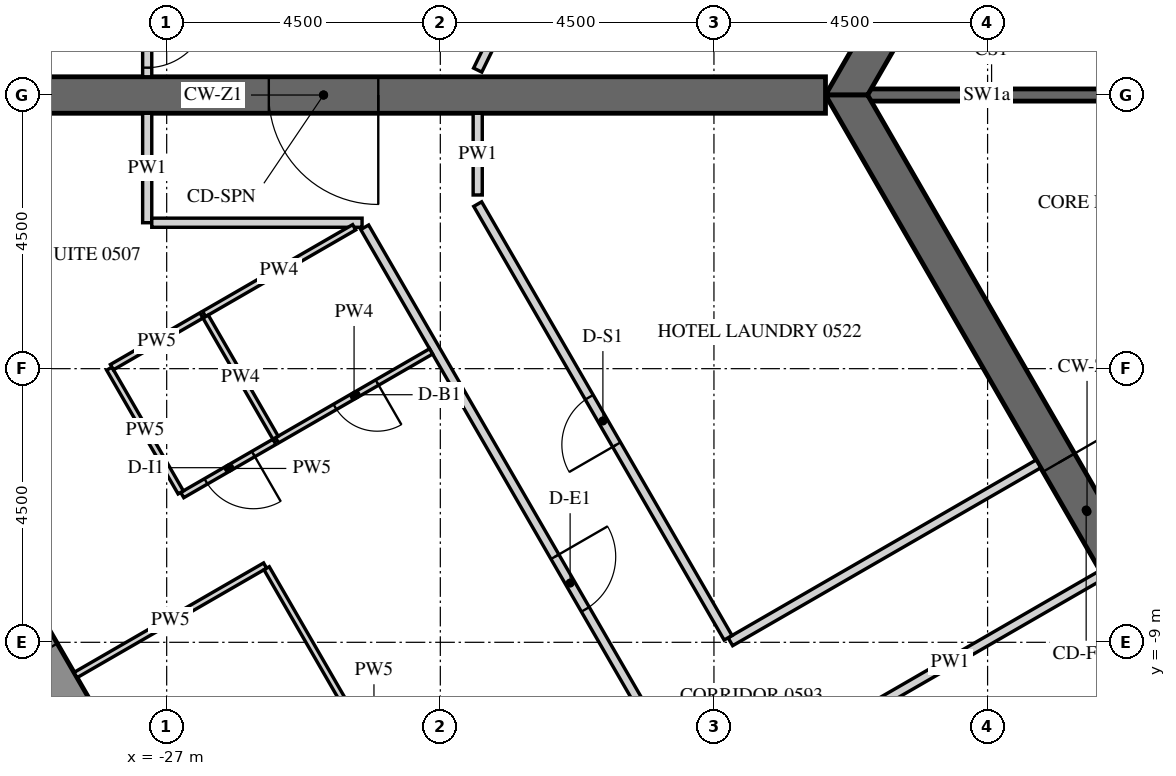
"""IFC4 building model, lengths in metres.
Left out: names, types, materials, properties, quantities, classifications, styles, units other than length and angle.
Written with IfcOpenShell. Run it as: python <this file> out.ifc"""

import sys

from ifc_helpers import new_model, si_unit, direction, frame, frame_2d, origin, place, context, subcontext, project, spatial, polyline, rectangle, outline, extrude, element, fill, save


model = new_model("IFC4")
c1 = context("Model", 3, precision=1e-05, world=origin(), true_north=direction((0.0, 1.0)))
c2 = subcontext(c1, "Body", "Model", "MODEL_VIEW")
j1 = project(units=[si_unit("LENGTHUNIT", "METRE"), si_unit("PLANEANGLEUNIT", "RADIAN")], contexts=[c1])
p1 = place(None, origin())
s1 = spatial("IfcSite", under=j1, at=p1, CompositionType="ELEMENT")
p2 = place(p1, origin())
s2 = spatial("IfcBuilding", under=s1, at=p2, CompositionType="ELEMENT")
p3 = place(p2, frame((0.0, 0.0, 80.4)))
s3 = spatial("IfcBuildingStorey", under=s2, at=p3, CompositionType="ELEMENT", Elevation=80.4)
p4 = place(p3, frame((-19.595, 27.633, -0.15), z_axis=(0.0, 0.0, 1.0), x_axis=(-0.438368285794, -0.898795441694, 0.0)))
e1 = element("IfcWall", 1, at=p4, inside=s3, PredefinedType="SOLIDWALL", context=c2, shape_type="SweptSolid", body=[
    extrude(outline(polyline([(-0.026, -0.275), (30.093, -0.275), (30.048, 0.275), (0.026, 0.275), (-0.026, -0.275)])), origin(), (0.0, 0.0, 1.0), 3.9),
])
p5 = place(p4, frame((1.236, 0.0, 1.05)))
e2 = element("IfcOpeningElement", 2, at=p5, cuts=e1, PredefinedType="OPENING", context=c2, shape_type="SweptSolid", body=[
    extrude(rectangle(XDim=2.4, YDim=2.4, at=frame_2d((1.2, 1.2))), frame((0.0, 0.285, 0.0), z_axis=(0.0, -1.0, 0.0), x_axis=(1.0, 0.0, 0.0)), (0.0, 0.0, 1.0), 0.57),
])
p6 = place(p4, frame((4.835, 0.0, 1.05)))
e3 = element("IfcOpeningElement", 3, at=p6, cuts=e1, PredefinedType="OPENING", context=c2, shape_type="SweptSolid", body=[
    extrude(rectangle(XDim=2.4, YDim=2.4, at=frame_2d((1.2, 1.2))), frame((0.0, 0.285, 0.0), z_axis=(0.0, -1.0, 0.0), x_axis=(1.0, 0.0, 0.0)), (0.0, 0.0, 1.0), 0.57),
])
p7 = place(p4, frame((8.436, 0.0, 1.05)))
e4 = element("IfcOpeningElement", 4, at=p7, cuts=e1, PredefinedType="OPENING", context=c2, shape_type="SweptSolid", body=[
    extrude(rectangle(XDim=2.4, YDim=2.4, at=frame_2d((1.2, 1.2))), frame((0.0, 0.285, 0.0), z_axis=(0.0, -1.0, 0.0), x_axis=(1.0, 0.0, 0.0)), (0.0, 0.0, 1.0), 0.57),
])
p8 = place(p4, frame((12.035, 0.0, 1.05)))
e5 = element("IfcOpeningElement", 5, at=p8, cuts=e1, PredefinedType="OPENING", context=c2, shape_type="SweptSolid", body=[
    extrude(rectangle(XDim=2.4, YDim=2.4, at=frame_2d((1.2, 1.2))), frame((0.0, 0.285, 0.0), z_axis=(0.0, -1.0, 0.0), x_axis=(1.0, 0.0, 0.0)), (0.0, 0.0, 1.0), 0.57),
])
p9 = place(p4, frame((15.635, 0.0, 1.05)))
e6 = element("IfcOpeningElement", 6, at=p9, cuts=e1, PredefinedType="OPENING", context=c2, shape_type="SweptSolid", body=[
    extrude(rectangle(XDim=2.4, YDim=2.4, at=frame_2d((1.2, 1.2))), frame((0.0, 0.285, 0.0), z_axis=(0.0, -1.0, 0.0), x_axis=(1.0, 0.0, 0.0)), (0.0, 0.0, 1.0), 0.57),
])
p10 = place(p4, frame((19.236, 0.0, 1.05)))
e7 = element("IfcOpeningElement", 7, at=p10, cuts=e1, PredefinedType="OPENING", context=c2, shape_type="SweptSolid", body=[
    extrude(rectangle(XDim=2.4, YDim=2.4, at=frame_2d((1.2, 1.2))), frame((0.0, 0.285, 0.0), z_axis=(0.0, -1.0, 0.0), x_axis=(1.0, 0.0, 0.0)), (0.0, 0.0, 1.0), 0.57),
])
p11 = place(p4, frame((22.835, 0.0, 1.05)))
e8 = element("IfcOpeningElement", 8, at=p11, cuts=e1, PredefinedType="OPENING", context=c2, shape_type="SweptSolid", body=[
    extrude(rectangle(XDim=2.4, YDim=2.4, at=frame_2d((1.2, 1.2))), frame((0.0, 0.285, 0.0), z_axis=(0.0, -1.0, 0.0), x_axis=(1.0, 0.0, 0.0)), (0.0, 0.0, 1.0), 0.57),
])
p12 = place(p4, frame((26.436, 0.0, 1.05)))
e9 = element("IfcOpeningElement", 9, at=p12, cuts=e1, PredefinedType="OPENING", context=c2, shape_type="SweptSolid", body=[
    extrude(rectangle(XDim=2.4, YDim=2.4, at=frame_2d((1.2, 1.2))), frame((0.0, 0.285, 0.0), z_axis=(0.0, -1.0, 0.0), x_axis=(1.0, 0.0, 0.0)), (0.0, 0.0, 1.0), 0.57),
])
p13 = place(p3, frame((-32.655, -2.89, -0.15), z_axis=(0.0, 0.0, 1.0), x_axis=(0.499997711317, -0.866026725152, 0.0)))
e10 = element("IfcWall", 10, at=p13, inside=s3, PredefinedType="SOLIDWALL", context=c2, shape_type="SweptSolid", body=[
    extrude(outline(polyline([(-0.022, -0.275), (30.097, -0.275), (30.045, 0.275), (0.022, 0.275), (-0.022, -0.275)])), origin(), (0.0, 0.0, 1.0), 3.9),
])
p14 = place(p13, frame((1.236, 0.0, 1.05)))
e11 = element("IfcOpeningElement", 11, at=p14, cuts=e10, PredefinedType="OPENING", context=c2, shape_type="SweptSolid", body=[
    extrude(rectangle(XDim=2.4, YDim=2.4, at=frame_2d((1.2, 1.2))), frame((0.0, 0.285, 0.0), z_axis=(0.0, -1.0, 0.0), x_axis=(1.0, 0.0, 0.0)), (0.0, 0.0, 1.0), 0.57),
])
p15 = place(p13, frame((4.835, 0.0, 1.05)))
e12 = element("IfcOpeningElement", 12, at=p15, cuts=e10, PredefinedType="OPENING", context=c2, shape_type="SweptSolid", body=[
    extrude(rectangle(XDim=2.4, YDim=2.4, at=frame_2d((1.2, 1.2))), frame((0.0, 0.285, 0.0), z_axis=(0.0, -1.0, 0.0), x_axis=(1.0, 0.0, 0.0)), (0.0, 0.0, 1.0), 0.57),
])
p16 = place(p13, frame((8.436, 0.0, 1.05)))
e13 = element("IfcOpeningElement", 13, at=p16, cuts=e10, PredefinedType="OPENING", context=c2, shape_type="SweptSolid", body=[
    extrude(rectangle(XDim=2.4, YDim=2.4, at=frame_2d((1.2, 1.2))), frame((0.0, 0.285, 0.0), z_axis=(0.0, -1.0, 0.0), x_axis=(1.0, 0.0, 0.0)), (0.0, 0.0, 1.0), 0.57),
])
p17 = place(p13, frame((12.035, 0.0, 1.05)))
e14 = element("IfcOpeningElement", 14, at=p17, cuts=e10, PredefinedType="OPENING", context=c2, shape_type="SweptSolid", body=[
    extrude(rectangle(XDim=2.4, YDim=2.4, at=frame_2d((1.2, 1.2))), frame((0.0, 0.285, 0.0), z_axis=(0.0, -1.0, 0.0), x_axis=(1.0, 0.0, 0.0)), (0.0, 0.0, 1.0), 0.57),
])
p18 = place(p13, frame((15.635, 0.0, 1.05)))
e15 = element("IfcOpeningElement", 15, at=p18, cuts=e10, PredefinedType="OPENING", context=c2, shape_type="SweptSolid", body=[
    extrude(rectangle(XDim=2.4, YDim=2.4, at=frame_2d((1.2, 1.2))), frame((0.0, 0.285, 0.0), z_axis=(0.0, -1.0, 0.0), x_axis=(1.0, 0.0, 0.0)), (0.0, 0.0, 1.0), 0.57),
])
p19 = place(p13, frame((19.236, 0.0, 1.05)))
e16 = element("IfcOpeningElement", 16, at=p19, cuts=e10, PredefinedType="OPENING", context=c2, shape_type="SweptSolid", body=[
    extrude(rectangle(XDim=2.4, YDim=2.4, at=frame_2d((1.2, 1.2))), frame((0.0, 0.285, 0.0), z_axis=(0.0, -1.0, 0.0), x_axis=(1.0, 0.0, 0.0)), (0.0, 0.0, 1.0), 0.57),
])
p20 = place(p13, frame((22.835, 0.0, 1.05)))
e17 = element("IfcOpeningElement", 17, at=p20, cuts=e10, PredefinedType="OPENING", context=c2, shape_type="SweptSolid", body=[
    extrude(rectangle(XDim=2.4, YDim=2.4, at=frame_2d((1.2, 1.2))), frame((0.0, 0.285, 0.0), z_axis=(0.0, -1.0, 0.0), x_axis=(1.0, 0.0, 0.0)), (0.0, 0.0, 1.0), 0.57),
])
p21 = place(p13, frame((26.436, 0.0, 1.05)))
e18 = element("IfcOpeningElement", 18, at=p21, cuts=e10, PredefinedType="OPENING", context=c2, shape_type="SweptSolid", body=[
    extrude(rectangle(XDim=2.4, YDim=2.4, at=frame_2d((1.2, 1.2))), frame((0.0, 0.285, 0.0), z_axis=(0.0, -1.0, 0.0), x_axis=(1.0, 0.0, 0.0)), (0.0, 0.0, 1.0), 0.57),
])
p22 = place(p3, frame((-7.91, 13.7, -0.15), z_axis=(0.0, 0.0, 1.0), x_axis=(-0.499999880136, -0.866025472988, 0.0)))
e19 = element("IfcWall", 19, at=p22, inside=s3, PredefinedType="SHEAR", context=c2, shape_type="SweptSolid", body=[
    extrude(outline(polyline([(-0.173, -0.3), (15.993, -0.3), (15.646, 0.3), (0.173, 0.3), (-0.173, -0.3)])), origin(), (0.0, 0.0, 1.0), 3.9),
])
p23 = place(p22, frame((7.039, 0.0, 0.15)))
e20 = element("IfcOpeningElement", 20, at=p23, cuts=e19, PredefinedType="OPENING", context=c2, shape_type="SweptSolid", body=[
    extrude(rectangle(XDim=1.8, YDim=2.4, at=frame_2d((0.9, 1.2))), frame((0.0, 0.31, 0.0), z_axis=(0.0, -1.0, 0.0), x_axis=(1.0, 0.0, 0.0)), (0.0, 0.0, 1.0), 0.62),
])
p24 = place(p3, frame((-15.819, 0.0, -0.15), z_axis=(0.0, 0.0, 1.0), x_axis=(0.499999880136, -0.866025472988, 0.0)))
e21 = element("IfcWall", 21, at=p24, inside=s3, PredefinedType="SHEAR", context=c2, shape_type="SweptSolid", body=[
    extrude(outline(polyline([(-0.173, -0.3), (15.993, -0.3), (15.646, 0.3), (0.173, 0.3), (-0.173, -0.3)])), origin(), (0.0, 0.0, 1.0), 3.9),
])
p25 = place(p24, frame((6.981, 0.0, 0.15)))
e22 = element("IfcOpeningElement", 22, at=p25, cuts=e21, PredefinedType="OPENING", context=c2, shape_type="SweptSolid", body=[
    extrude(rectangle(XDim=1.8, YDim=2.4, at=frame_2d((0.9, 1.2))), frame((0.0, 0.31, 0.0), z_axis=(0.0, -1.0, 0.0), x_axis=(1.0, 0.0, 0.0)), (0.0, 0.0, 1.0), 0.62),
])
p26 = place(p3, frame((-16.166, 0.0, -0.15), z_axis=(0.0, 0.0, 1.0), x_axis=(-1.0, 0.0, 0.0)))
e23 = element("IfcWall", 23, at=p26, inside=s3, PredefinedType="SHEAR", context=c2, shape_type="SweptSolid", body=[
    extrude(rectangle(XDim=16.509, YDim=0.6, at=frame_2d((8.254, 0.0))), origin(), (0.0, 0.0, 1.0), 3.9),
])
p27 = place(p26, frame((7.354, 0.0, 0.15)))
e24 = element("IfcOpeningElement", 24, at=p27, cuts=e23, PredefinedType="OPENING", context=c2, shape_type="SweptSolid", body=[
    extrude(rectangle(XDim=1.8, YDim=2.4, at=frame_2d((0.9, 1.2))), frame((0.0, 0.31, 0.0), z_axis=(0.0, -1.0, 0.0), x_axis=(1.0, 0.0, 0.0)), (0.0, 0.0, 1.0), 0.62),
])
p28 = place(p3, frame((-11.547, 0.0, -0.15), z_axis=(0.0, 0.0, 1.0), x_axis=(-1.0, 0.0, 0.0)))
e25 = element("IfcWall", 25, at=p28, inside=s3, PredefinedType="SHEAR", context=c2, shape_type="SweptSolid", body=[
    extrude(rectangle(XDim=3.926, YDim=0.2, at=frame_2d((1.963, 0.0))), origin(), (0.0, 0.0, 1.0), 3.9),
])
p29 = place(p3, frame((-27.32, 2.025, 0.0), z_axis=(0.0, 0.0, 1.0), x_axis=(0.0, -1.0, 0.0)))
e26 = element("IfcWall", 26, at=p29, inside=s3, PredefinedType="PARTITIONING", context=c2, shape_type="SweptSolid", body=[
    extrude(rectangle(XDim=1.725, YDim=0.15, at=frame_2d((0.862, 0.0))), origin(), (0.0, 0.0, 1.0), 2.988),
])
p30 = place(p29, frame((0.575, 0.0, 0.0)))
e27 = element("IfcOpeningElement", 27, at=p30, cuts=e26, PredefinedType="OPENING", context=c2, shape_type="SweptSolid", body=[
    extrude(rectangle(XDim=1.0, YDim=2.1, at=frame_2d((0.5, 1.05))), frame((0.0, 0.085, 0.0), z_axis=(0.0, -1.0, 0.0), x_axis=(1.0, 0.0, 0.0)), (0.0, 0.0, 1.0), 0.17),
])
p31 = place(p3, frame((-21.885, 0.41, 0.0), z_axis=(0.0, 0.0, 1.0), x_axis=(0.43837064471, 0.898794291179, 0.0)))
e28 = element("IfcWall", 28, at=p31, inside=s3, PredefinedType="PARTITIONING", context=c2, shape_type="SweptSolid", body=[
    extrude(rectangle(XDim=9.532, YDim=0.15, at=frame_2d((4.766, 0.0))), origin(), (0.0, 0.0, 1.0), 2.988),
])
p32 = place(p31, frame((4.316, 0.0, 0.0)))
e29 = element("IfcOpeningElement", 29, at=p32, cuts=e28, PredefinedType="OPENING", context=c2, shape_type="SweptSolid", body=[
    extrude(rectangle(XDim=0.9, YDim=2.1, at=frame_2d((0.45, 1.05))), frame((0.0, 0.085, 0.0), z_axis=(0.0, -1.0, 0.0), x_axis=(1.0, 0.0, 0.0)), (0.0, 0.0, 1.0), 0.17),
])
p33 = place(p3, frame((-27.32, -0.3, 0.0), z_axis=(0.0, 0.0, 1.0), x_axis=(0.0, -1.0, 0.0)))
e30 = element("IfcWall", 30, at=p33, inside=s3, PredefinedType="PARTITIONING", context=c2, shape_type="SweptSolid", body=[
    extrude(rectangle(XDim=1.8, YDim=0.15, at=frame_2d((0.9, 0.0))), origin(), (0.0, 0.0, 1.0), 2.988),
])
p34 = place(p3, frame((-27.245, -2.1, 0.0), z_axis=(0.0, 0.0, 1.0), x_axis=(1.0, 0.0, 0.0)))
e31 = element("IfcWall", 31, at=p34, inside=s3, PredefinedType="PARTITIONING", context=c2, shape_type="SweptSolid", body=[
    extrude(rectangle(XDim=3.458, YDim=0.15, at=frame_2d((1.729, 0.0))), origin(), (0.0, 0.0, 1.0), 2.988),
])
p35 = place(p3, frame((-23.743, -2.175, 0.0), z_axis=(0.0, 0.0, 1.0), x_axis=(0.499992353047, -0.86602981871, 0.0)))
e32 = element("IfcWall", 32, at=p35, inside=s3, PredefinedType="PARTITIONING", context=c2, shape_type="SweptSolid", body=[
    extrude(rectangle(XDim=23.516, YDim=0.15, at=frame_2d((11.758, 0.0))), origin(), (0.0, 0.0, 1.0), 2.988),
])
p36 = place(p35, frame((6.256, 0.0, 0.0)))
e33 = element("IfcOpeningElement", 33, at=p36, cuts=e32, PredefinedType="OPENING", context=c2, shape_type="SweptSolid", body=[
    extrude(rectangle(XDim=1.0, YDim=2.1, at=frame_2d((0.5, 1.05))), frame((0.0, 0.085, 0.0), z_axis=(0.0, -1.0, 0.0), x_axis=(1.0, 0.0, 0.0)), (0.0, 0.0, 1.0), 0.17),
])
p37 = place(p35, frame((13.099, 0.0, 0.0)))
e34 = element("IfcOpeningElement", 34, at=p37, cuts=e32, PredefinedType="OPENING", context=c2, shape_type="SweptSolid", body=[
    extrude(rectangle(XDim=1.0, YDim=2.1, at=frame_2d((0.5, 1.05))), frame((0.0, 0.085, 0.0), z_axis=(0.0, -1.0, 0.0), x_axis=(1.0, 0.0, 0.0)), (0.0, 0.0, 1.0), 0.17),
])
p38 = place(p35, frame((18.749, 0.0, 0.0)))
e35 = element("IfcOpeningElement", 35, at=p38, cuts=e32, PredefinedType="OPENING", context=c2, shape_type="SweptSolid", body=[
    extrude(rectangle(XDim=1.0, YDim=2.1, at=frame_2d((0.5, 1.05))), frame((0.0, 0.085, 0.0), z_axis=(0.0, -1.0, 0.0), x_axis=(1.0, 0.0, 0.0)), (0.0, 0.0, 1.0), 0.17),
])
p39 = place(p3, frame((-12.664, -6.066, 0.0), z_axis=(0.0, 0.0, 1.0), x_axis=(-0.866018092707, -0.500012662943, 0.0)))
e36 = element("IfcWall", 36, at=p39, inside=s3, PredefinedType="PARTITIONING", context=c2, shape_type="SweptSolid", body=[
    extrude(rectangle(XDim=5.85, YDim=0.15, at=frame_2d((2.925, 0.0))), origin(), (0.0, 0.0, 1.0), 2.988),
])
p40 = place(p3, frame((-17.768, -8.926, 0.0), z_axis=(0.0, 0.0, 1.0), x_axis=(-0.499997033681, 0.866027116383, 0.0)))
e37 = element("IfcWall", 37, at=p40, inside=s3, PredefinedType="PARTITIONING", context=c2, shape_type="SweptSolid", body=[
    extrude(rectangle(XDim=8.235, YDim=0.15, at=frame_2d((4.118, 0.0))), origin(), (0.0, 0.0, 1.0), 2.988),
])
p41 = place(p40, frame((3.668, 0.0, 0.0)))
e38 = element("IfcOpeningElement", 38, at=p41, cuts=e37, PredefinedType="OPENING", context=c2, shape_type="SweptSolid", body=[
    extrude(rectangle(XDim=0.9, YDim=2.1, at=frame_2d((0.45, 1.05))), frame((0.0, 0.085, 0.0), z_axis=(0.0, -1.0, 0.0), x_axis=(1.0, 0.0, 0.0)), (0.0, 0.0, 1.0), 0.17),
])
p42 = place(p3, frame((-21.885, -1.644, 0.0), z_axis=(0.0, 0.0, 1.0), x_axis=(0.0, 1.0, 0.0)))
e39 = element("IfcWall", 39, at=p42, inside=s3, PredefinedType="PARTITIONING", context=c2, shape_type="SweptSolid", body=[
    extrude(rectangle(XDim=1.344, YDim=0.15, at=frame_2d((0.672, 0.0))), origin(), (0.0, 0.0, 1.0), 2.988),
])
p43 = place(p3, frame((-16.615, -10.772, 0.0), z_axis=(0.0, 0.0, 1.0), x_axis=(0.866025774745, 0.499999357477, 0.0)))
e40 = element("IfcWall", 40, at=p43, inside=s3, PredefinedType="PARTITIONING", context=c2, shape_type="SweptSolid", body=[
    extrude(rectangle(XDim=5.775, YDim=0.15, at=frame_2d((2.887, 0.0))), origin(), (0.0, 0.0, 1.0), 2.988),
])
p44 = place(p3, frame((-26.385, -3.6, 0.0), z_axis=(0.0, 0.0, 1.0), x_axis=(0.866025820012, 0.499999279071, 0.0)))
e41 = element("IfcWall", 41, at=p44, inside=s3, PredefinedType="PARTITIONING", context=c2, shape_type="SweptSolid", body=[
    extrude(rectangle(XDim=2.85, YDim=0.1, at=frame_2d((1.425, 0.0))), origin(), (0.0, 0.0, 1.0), 2.988),
])
p45 = place(p3, frame((-22.652, -4.216, 0.0), z_axis=(0.0, 0.0, 1.0), x_axis=(-0.866025730634, -0.499999433879, 0.0)))
e42 = element("IfcWall", 42, at=p45, inside=s3, PredefinedType="PARTITIONING", context=c2, shape_type="SweptSolid", body=[
    extrude(rectangle(XDim=2.925, YDim=0.1, at=frame_2d((1.462, 0.0))), origin(), (0.0, 0.0, 1.0), 2.988),
])
p46 = place(p45, frame((1.025, 0.0, 0.0)))
e43 = element("IfcOpeningElement", 43, at=p46, cuts=e42, PredefinedType="OPENING", context=c2, shape_type="SweptSolid", body=[
    extrude(rectangle(XDim=0.8, YDim=2.1, at=frame_2d((0.4, 1.05))), frame((0.0, 0.06, 0.0), z_axis=(0.0, -1.0, 0.0), x_axis=(1.0, 0.0, 0.0)), (0.0, 0.0, 1.0), 0.12),
])
p47 = place(p3, frame((-25.228, -5.703, 0.0), z_axis=(0.0, 0.0, 1.0), x_axis=(-0.866002029911, -0.500040482552, 0.0)))
e44 = element("IfcWall", 44, at=p47, inside=s3, PredefinedType="PARTITIONING", context=c2, shape_type="SweptSolid", body=[
    extrude(rectangle(XDim=1.75, YDim=0.1, at=frame_2d((0.875, 0.0))), origin(), (0.0, 0.0, 1.0), 2.988),
])
p48 = place(p47, frame((0.4, 0.0, 0.0)))
e45 = element("IfcOpeningElement", 45, at=p48, cuts=e44, PredefinedType="OPENING", context=c2, shape_type="SweptSolid", body=[
    extrude(rectangle(XDim=0.9, YDim=2.1, at=frame_2d((0.45, 1.05))), frame((0.0, 0.06, 0.0), z_axis=(0.0, -1.0, 0.0), x_axis=(1.0, 0.0, 0.0)), (0.0, 0.0, 1.0), 0.12),
])
p49 = place(p3, frame((-26.769, -6.535, 0.0), z_axis=(0.0, 0.0, 1.0), x_axis=(-0.500016218704, 0.866016039709, 0.0)))
e46 = element("IfcWall", 46, at=p49, inside=s3, PredefinedType="PARTITIONING", context=c2, shape_type="SweptSolid", body=[
    extrude(rectangle(XDim=2.35, YDim=0.1, at=frame_2d((1.175, 0.0))), origin(), (0.0, 0.0, 1.0), 2.988),
])
p50 = place(p3, frame((-27.9, -4.475, 0.0), z_axis=(0.0, 0.0, 1.0), x_axis=(0.865989465428, 0.500062241894, 0.0)))
e47 = element("IfcWall", 47, at=p50, inside=s3, PredefinedType="PARTITIONING", context=c2, shape_type="SweptSolid", body=[
    extrude(rectangle(XDim=1.7, YDim=0.1, at=frame_2d((0.85, 0.0))), origin(), (0.0, 0.0, 1.0), 2.988),
])
p51 = place(p3, frame((-28.499, -9.538, 0.0), z_axis=(0.0, 0.0, 1.0), x_axis=(0.866047807691, 0.499961193289, 0.0)))
e48 = element("IfcWall", 48, at=p51, inside=s3, PredefinedType="PARTITIONING", context=c2, shape_type="SweptSolid", body=[
    extrude(rectangle(XDim=3.6, YDim=0.1, at=frame_2d((1.8, 0.0))), origin(), (0.0, 0.0, 1.0), 2.988),
])
p52 = place(p3, frame((-25.356, -7.782, 0.0), z_axis=(0.0, 0.0, 1.0), x_axis=(0.500010820671, -0.866019156377, 0.0)))
e49 = element("IfcWall", 49, at=p52, inside=s3, PredefinedType="PARTITIONING", context=c2, shape_type="SweptSolid", body=[
    extrude(rectangle(XDim=7.06, YDim=0.1, at=frame_2d((3.53, 0.0))), origin(), (0.0, 0.0, 1.0), 2.988),
])
p53 = place(p52, frame((3.1, 0.0, 0.0)))
e50 = element("IfcOpeningElement", 50, at=p53, cuts=e49, PredefinedType="OPENING", context=c2, shape_type="SweptSolid", body=[
    extrude(rectangle(XDim=0.9, YDim=2.1, at=frame_2d((0.45, 1.05))), frame((0.0, 0.06, 0.0), z_axis=(0.0, -1.0, 0.0), x_axis=(1.0, 0.0, 0.0)), (0.0, 0.0, 1.0), 0.12),
])
p54 = place(p3, frame((-26.36, -3.643, 0.0), z_axis=(0.0, 0.0, 1.0), x_axis=(0.499952165731, -0.866053019151, 0.0)))
e51 = element("IfcWall", 51, at=p54, inside=s3, PredefinedType="PARTITIONING", context=c2, shape_type="SweptSolid", body=[
    extrude(rectangle(XDim=2.3, YDim=0.1, at=frame_2d((1.15, 0.0))), origin(), (0.0, 0.0, 1.0), 2.988),
])
p55 = place(p15, frame((0.0, 0.205, 0.0)))
e52 = element("IfcWindow", 52, at=p55, inside=s3, PartitioningType="DOUBLE_PANEL_VERTICAL", PredefinedType="WINDOW", context=c2, shape_type="SweptSolid", body=[
    extrude(rectangle(XDim=2.4, YDim=2.4, at=frame_2d((1.2, 1.2))), frame((0.0, 0.03, 0.0), z_axis=(0.0, -1.0, 0.0), x_axis=(1.0, 0.0, 0.0)), (0.0, 0.0, 1.0), 0.06),
])
fill(e12, e52)
p56 = place(p25, origin())
e53 = element("IfcDoor", 53, at=p56, inside=s3, OperationType="DOUBLE_DOOR_SINGLE_SWING", PredefinedType="DOOR", context=c2, shape_type="SweptSolid", body=[
    extrude(rectangle(XDim=1.8, YDim=2.4, at=frame_2d((0.9, 1.2))), frame((0.0, 0.025, 0.0), z_axis=(0.0, -1.0, 0.0), x_axis=(1.0, 0.0, 0.0)), (0.0, 0.0, 1.0), 0.05),
])
fill(e22, e53)
p57 = place(p27, origin())
e54 = element("IfcDoor", 54, at=p57, inside=s3, OperationType="DOUBLE_DOOR_SINGLE_SWING", PredefinedType="DOOR", context=c2, shape_type="SweptSolid", body=[
    extrude(rectangle(XDim=1.8, YDim=2.4, at=frame_2d((0.9, 1.2))), frame((0.0, 0.025, 0.0), z_axis=(0.0, -1.0, 0.0), x_axis=(1.0, 0.0, 0.0)), (0.0, 0.0, 1.0), 0.05),
])
fill(e24, e54)
p58 = place(p30, origin())
e55 = element("IfcDoor", 55, at=p58, inside=s3, OperationType="SINGLE_SWING_LEFT", PredefinedType="DOOR", context=c2, shape_type="SweptSolid", body=[
    extrude(rectangle(XDim=1.0, YDim=2.1, at=frame_2d((0.5, 1.05))), frame((0.0, 0.025, 0.0), z_axis=(0.0, -1.0, 0.0), x_axis=(1.0, 0.0, 0.0)), (0.0, 0.0, 1.0), 0.05),
])
fill(e27, e55)
p59 = place(p36, origin())
e56 = element("IfcDoor", 56, at=p59, inside=s3, OperationType="SINGLE_SWING_LEFT", PredefinedType="DOOR", context=c2, shape_type="SweptSolid", body=[
    extrude(rectangle(XDim=1.0, YDim=2.1, at=frame_2d((0.5, 1.05))), frame((0.0, 0.025, 0.0), z_axis=(0.0, -1.0, 0.0), x_axis=(1.0, 0.0, 0.0)), (0.0, 0.0, 1.0), 0.05),
])
fill(e33, e56)
p60 = place(p46, origin())
e57 = element("IfcDoor", 57, at=p60, inside=s3, OperationType="SINGLE_SWING_RIGHT", PredefinedType="DOOR", context=c2, shape_type="SweptSolid", body=[
    extrude(rectangle(XDim=0.8, YDim=2.1, at=frame_2d((0.4, 1.05))), frame((0.0, 0.025, 0.0), z_axis=(0.0, -1.0, 0.0), x_axis=(1.0, 0.0, 0.0)), (0.0, 0.0, 1.0), 0.05),
])
fill(e43, e57)
p61 = place(p48, origin())
e58 = element("IfcDoor", 58, at=p61, inside=s3, OperationType="SINGLE_SWING_LEFT", PredefinedType="DOOR", context=c2, shape_type="SweptSolid", body=[
    extrude(rectangle(XDim=0.9, YDim=2.1, at=frame_2d((0.45, 1.05))), frame((0.0, 0.025, 0.0), z_axis=(0.0, -1.0, 0.0), x_axis=(1.0, 0.0, 0.0)), (0.0, 0.0, 1.0), 0.05),
])
fill(e45, e58)
p62 = place(p41, origin())
e59 = element("IfcDoor", 59, at=p62, inside=s3, OperationType="SINGLE_SWING_RIGHT", PredefinedType="DOOR", context=c2, shape_type="SweptSolid", body=[
    extrude(rectangle(XDim=0.9, YDim=2.1, at=frame_2d((0.45, 1.05))), frame((0.0, 0.025, 0.0), z_axis=(0.0, -1.0, 0.0), x_axis=(1.0, 0.0, 0.0)), (0.0, 0.0, 1.0), 0.05),
])
fill(e38, e59)
save(model, sys.argv[1])
